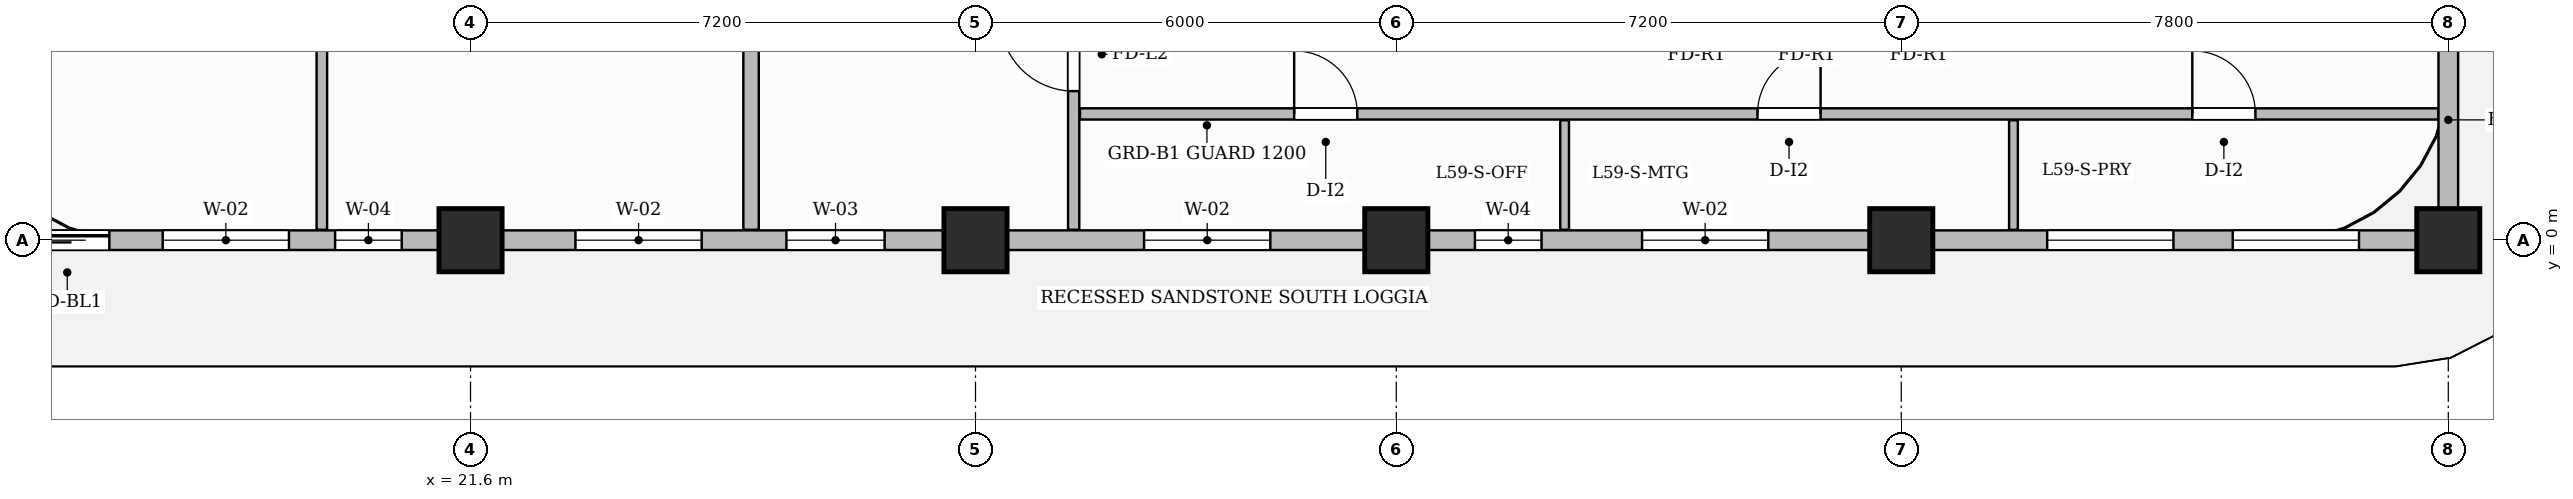
"""IFC4 building model, lengths in metres.
Left out: names, types, materials, properties, quantities, classifications, styles, units other than length and angle.
Written with IfcOpenShell. Run it as: python <this file> out.ifc"""

import sys

from ifc_helpers import new_model, si_unit, direction, frame, frame_2d, origin, origin_2d, place, context, subcontext, project, spatial, rectangle, extrude, source, transform, mapped, element, fill, save


model = new_model("IFC4")
c1 = context("Model", 3, precision=1e-05, world=origin(), true_north=direction((0.0, 1.0)))
c2 = subcontext(c1, "Body", "Model", "MODEL_VIEW")
j1 = project(units=[si_unit("LENGTHUNIT", "METRE"), si_unit("PLANEANGLEUNIT", "RADIAN")], contexts=[c1])
p1 = place(None, origin())
s1 = spatial("IfcSite", under=j1, at=p1, CompositionType="ELEMENT")
p2 = place(p1, origin())
s2 = spatial("IfcBuilding", under=s1, at=p2, CompositionType="ELEMENT")
p3 = place(p2, frame((0.0, 0.0, 236.55)))
s3 = spatial("IfcBuildingStorey", under=s2, at=p3, CompositionType="ELEMENT", Elevation=236.55)
m1 = source(origin(), c2, "Body", "SweptSolid", [
    extrude(rectangle(XDim=0.9, YDim=0.9, at=origin_2d()), origin(), (0.0, 0.0, 1.0), 3.85),
])
for number, where, z_axis, x_axis in (
    (1, (21.6, 0.0, 0.0), (0.0, 0.0, 1.0), (1.0, 0.0, 0.0)),
    (2, (28.8, 0.0, 0.0), (0.0, 0.0, 1.0), (1.0, 0.0, 0.0)),
    (3, (34.8, 0.0, 0.0), (0.0, 0.0, 1.0), (1.0, 0.0, 0.0)),
    (4, (42.0, 0.0, 0.0), (0.0, 0.0, 1.0), (1.0, 0.0, 0.0)),
    (5, (49.8, 0.0, 0.0), (0.0, 0.0, 1.0), (1.0, 0.0, 0.0)),
):
    element("IfcColumn", number, at=place(p3, frame(where, z_axis=z_axis, x_axis=x_axis)), inside=s3, PredefinedType="COLUMN", context=c2, shape_type="MappedRepresentation", body=[
        mapped(m1, transform((0.0, 0.0, 0.0), scale=1.0)),
    ])
p4 = place(p3, frame((30.2, 0.148, 0.0), z_axis=(0.0, 0.0, 1.0), x_axis=(0.0, 1.0, 0.0)))
e6 = element("IfcWall", 6, at=p4, inside=s3, PredefinedType="PARTITIONING", context=c2, shape_type="SweptSolid", body=[
    extrude(rectangle(XDim=10.112, YDim=0.16, at=frame_2d((5.056, 0.0))), origin(), (0.0, 0.0, 1.0), 3.6),
])
p5 = place(p4, frame((1.977, 0.0, 0.0)))
e7 = element("IfcOpeningElement", 7, at=p5, cuts=e6, PredefinedType="OPENING", context=c2, shape_type="SweptSolid", body=[
    extrude(rectangle(XDim=1.05, YDim=2.15, at=frame_2d((0.525, 1.075))), frame((0.0, 0.09, 0.0), z_axis=(0.0, -1.0, 0.0), x_axis=(1.0, 0.0, 0.0)), (0.0, 0.0, 1.0), 0.18),
])
p6 = place(p3, frame((30.29, 1.8, 0.0), z_axis=(0.0, 0.0, 1.0), x_axis=(1.0, 0.0, 0.0)))
e8 = element("IfcWall", 8, at=p6, inside=s3, PredefinedType="PARTITIONING", context=c2, shape_type="SweptSolid", body=[
    extrude(rectangle(XDim=19.37, YDim=0.16, at=frame_2d((9.685, 0.0))), origin(), (0.0, 0.0, 1.0), 3.6),
])
p7 = place(p6, frame((3.054, 0.0, 0.0)))
e9 = element("IfcOpeningElement", 9, at=p7, cuts=e8, PredefinedType="OPENING", context=c2, shape_type="SweptSolid", body=[
    extrude(rectangle(XDim=0.9, YDim=2.15, at=frame_2d((0.45, 1.075))), frame((0.0, 0.09, 0.0), z_axis=(0.0, -1.0, 0.0), x_axis=(1.0, 0.0, 0.0)), (0.0, 0.0, 1.0), 0.18),
])
p8 = place(p6, frame((9.66, 0.0, 0.0)))
e10 = element("IfcOpeningElement", 10, at=p8, cuts=e8, PredefinedType="OPENING", context=c2, shape_type="SweptSolid", body=[
    extrude(rectangle(XDim=0.9, YDim=2.15, at=frame_2d((0.45, 1.075))), frame((0.0, 0.09, 0.0), z_axis=(0.0, -1.0, 0.0), x_axis=(1.0, 0.0, 0.0)), (0.0, 0.0, 1.0), 0.18),
])
p9 = place(p6, frame((15.86, 0.0, 0.0)))
e11 = element("IfcOpeningElement", 11, at=p9, cuts=e8, PredefinedType="OPENING", context=c2, shape_type="SweptSolid", body=[
    extrude(rectangle(XDim=0.9, YDim=2.15, at=frame_2d((0.45, 1.075))), frame((0.0, 0.09, 0.0), z_axis=(0.0, -1.0, 0.0), x_axis=(1.0, 0.0, 0.0)), (0.0, 0.0, 1.0), 0.18),
])
for number, where, z_axis, x_axis in (
    (12, (37.2, 0.148, 0.0), (0.0, 0.0, 1.0), (0.0, 1.0, 0.0)),
    (13, (43.6, 0.148, 0.0), (0.0, 0.0, 1.0), (0.0, 1.0, 0.0)),
):
    element("IfcWall", number, at=place(p3, frame(where, z_axis=z_axis, x_axis=x_axis)), inside=s3, PredefinedType="PARTITIONING", context=c2, shape_type="SweptSolid", body=[
        extrude(rectangle(XDim=1.562, YDim=0.125, at=frame_2d((0.781, 0.0))), origin(), (0.0, 0.0, 1.0), 3.6),
    ])
p10 = place(p3, frame((25.6, 0.148, 0.0), z_axis=(0.0, 0.0, 1.0), x_axis=(0.0, 1.0, 0.0)))
e14 = element("IfcWall", 14, at=p10, inside=s3, PredefinedType="PARTITIONING", context=c2, shape_type="SweptSolid", body=[
    extrude(rectangle(XDim=10.112, YDim=0.22, at=frame_2d((5.056, 0.0))), origin(), (0.0, 0.0, 1.0), 3.6),
])
p11 = place(p3, frame((19.48, 0.148, 0.0), z_axis=(0.0, 0.0, 1.0), x_axis=(0.0, 1.0, 0.0)))
e15 = element("IfcWall", 15, at=p11, inside=s3, PredefinedType="PARTITIONING", context=c2, shape_type="SweptSolid", body=[
    extrude(rectangle(XDim=10.112, YDim=0.15, at=frame_2d((5.056, 0.0))), origin(), (0.0, 0.0, 1.0), 3.6),
])
p12 = place(p11, frame((8.677, 0.0, 0.0)))
e16 = element("IfcOpeningElement", 16, at=p12, cuts=e15, PredefinedType="OPENING", context=c2, shape_type="SweptSolid", body=[
    extrude(rectangle(XDim=0.9, YDim=2.15, at=frame_2d((0.45, 1.075))), frame((0.0, 0.085, 0.0), z_axis=(0.0, -1.0, 0.0), x_axis=(1.0, 0.0, 0.0)), (0.0, 0.0, 1.0), 0.17),
])
p13 = place(p3, frame((14.4, 0.0, 0.0), z_axis=(0.0, 0.0, 1.0), x_axis=(1.0, 0.0, 0.0)))
e17 = element("IfcWall", 17, at=p13, inside=s3, PredefinedType="SOLIDWALL", context=c2, shape_type="SweptSolid", body=[
    extrude(rectangle(XDim=35.4, YDim=0.28, at=frame_2d((17.7, 0.0))), origin(), (0.0, 0.0, 1.0), 3.135),
])
p14 = place(p13, frame((0.85, 0.0, 0.0)))
e18 = element("IfcOpeningElement", 18, at=p14, cuts=e17, PredefinedType="OPENING", context=c2, shape_type="SweptSolid", body=[
    extrude(rectangle(XDim=1.2, YDim=2.2, at=frame_2d((0.6, 1.1))), frame((0.0, 0.15, 0.0), z_axis=(0.0, -1.0, 0.0), x_axis=(1.0, 0.0, 0.0)), (0.0, 0.0, 1.0), 0.3),
])
p15 = place(p13, frame((2.811, 0.0, 0.8)))
e19 = element("IfcOpeningElement", 19, at=p15, cuts=e17, PredefinedType="OPENING", context=c2, shape_type="SweptSolid", body=[
    extrude(rectangle(XDim=1.8, YDim=1.85, at=frame_2d((0.9, 0.925))), frame((0.0, 0.15, 0.0), z_axis=(0.0, -1.0, 0.0), x_axis=(1.0, 0.0, 0.0)), (0.0, 0.0, 1.0), 0.3),
])
p16 = place(p13, frame((5.269, 0.0, 0.8)))
e20 = element("IfcOpeningElement", 20, at=p16, cuts=e17, PredefinedType="OPENING", context=c2, shape_type="SweptSolid", body=[
    extrude(rectangle(XDim=0.95, YDim=1.75, at=frame_2d((0.475, 0.875))), frame((0.0, 0.15, 0.0), z_axis=(0.0, -1.0, 0.0), x_axis=(1.0, 0.0, 0.0)), (0.0, 0.0, 1.0), 0.3),
])
p17 = place(p13, frame((8.696, 0.0, 0.8)))
e21 = element("IfcOpeningElement", 21, at=p17, cuts=e17, PredefinedType="OPENING", context=c2, shape_type="SweptSolid", body=[
    extrude(rectangle(XDim=1.8, YDim=1.85, at=frame_2d((0.9, 0.925))), frame((0.0, 0.15, 0.0), z_axis=(0.0, -1.0, 0.0), x_axis=(1.0, 0.0, 0.0)), (0.0, 0.0, 1.0), 0.3),
])
p18 = place(p13, frame((11.704, 0.0, 0.8)))
e22 = element("IfcOpeningElement", 22, at=p18, cuts=e17, PredefinedType="OPENING", context=c2, shape_type="SweptSolid", body=[
    extrude(rectangle(XDim=1.4, YDim=1.85, at=frame_2d((0.7, 0.925))), frame((0.0, 0.15, 0.0), z_axis=(0.0, -1.0, 0.0), x_axis=(1.0, 0.0, 0.0)), (0.0, 0.0, 1.0), 0.3),
])
p19 = place(p13, frame((16.804, 0.0, 0.8)))
e23 = element("IfcOpeningElement", 23, at=p19, cuts=e17, PredefinedType="OPENING", context=c2, shape_type="SweptSolid", body=[
    extrude(rectangle(XDim=1.8, YDim=1.85, at=frame_2d((0.9, 0.925))), frame((0.0, 0.15, 0.0), z_axis=(0.0, -1.0, 0.0), x_axis=(1.0, 0.0, 0.0)), (0.0, 0.0, 1.0), 0.3),
])
p20 = place(p13, frame((21.521, 0.0, 0.8)))
e24 = element("IfcOpeningElement", 24, at=p20, cuts=e17, PredefinedType="OPENING", context=c2, shape_type="SweptSolid", body=[
    extrude(rectangle(XDim=0.95, YDim=1.75, at=frame_2d((0.475, 0.875))), frame((0.0, 0.15, 0.0), z_axis=(0.0, -1.0, 0.0), x_axis=(1.0, 0.0, 0.0)), (0.0, 0.0, 1.0), 0.3),
])
p21 = place(p13, frame((23.904, 0.0, 0.8)))
e25 = element("IfcOpeningElement", 25, at=p21, cuts=e17, PredefinedType="OPENING", context=c2, shape_type="SweptSolid", body=[
    extrude(rectangle(XDim=1.8, YDim=1.85, at=frame_2d((0.9, 0.925))), frame((0.0, 0.15, 0.0), z_axis=(0.0, -1.0, 0.0), x_axis=(1.0, 0.0, 0.0)), (0.0, 0.0, 1.0), 0.3),
])
p22 = place(p13, frame((29.681, 0.0, 0.8)))
e26 = element("IfcOpeningElement", 26, at=p22, cuts=e17, PredefinedType="OPENING", context=c2, shape_type="SweptSolid", body=[
    extrude(rectangle(XDim=1.8, YDim=1.85, at=frame_2d((0.9, 0.925))), frame((0.0, 0.15, 0.0), z_axis=(0.0, -1.0, 0.0), x_axis=(1.0, 0.0, 0.0)), (0.0, 0.0, 1.0), 0.3),
])
p23 = place(p13, frame((32.327, 0.0, 0.8)))
e27 = element("IfcOpeningElement", 27, at=p23, cuts=e17, PredefinedType="OPENING", context=c2, shape_type="SweptSolid", body=[
    extrude(rectangle(XDim=1.8, YDim=1.85, at=frame_2d((0.9, 0.925))), frame((0.0, 0.15, 0.0), z_axis=(0.0, -1.0, 0.0), x_axis=(1.0, 0.0, 0.0)), (0.0, 0.0, 1.0), 0.3),
])
p24 = place(p3, frame((49.8, 0.05, 0.0), z_axis=(0.0, 0.0, 1.0), x_axis=(0.0, 1.0, 0.0)))
e28 = element("IfcWall", 28, at=p24, inside=s3, PredefinedType="SOLIDWALL", context=c2, shape_type="SweptSolid", body=[
    extrude(rectangle(XDim=3.33, YDim=0.28, at=frame_2d((1.665, 0.0))), origin(), (0.0, 0.0, 1.0), 3.6),
])
m2 = source(origin(), c2, "Body", "SweptSolid", [
    extrude(rectangle(XDim=1.05, YDim=2.15, at=frame_2d((0.525, 1.075))), frame((0.0, 0.025, 0.0), z_axis=(0.0, -1.0, 0.0), x_axis=(1.0, 0.0, 0.0)), (0.0, 0.0, 1.0), 0.05),
])
p25 = place(p5, origin())
e29 = element("IfcDoor", 29, at=p25, inside=s3, OperationType="SINGLE_SWING_RIGHT", PredefinedType="DOOR", context=c2, shape_type="MappedRepresentation", body=[
    mapped(m2, transform((0.0, 0.0, 0.0), scale=1.0)),
])
fill(e7, e29)
m3 = source(origin(), c2, "Body", "SweptSolid", [
    extrude(rectangle(XDim=0.9, YDim=2.15, at=frame_2d((0.45, 1.075))), frame((0.0, 0.025, 0.0), z_axis=(0.0, -1.0, 0.0), x_axis=(1.0, 0.0, 0.0)), (0.0, 0.0, 1.0), 0.05),
])
p26 = place(p7, origin())
e30 = element("IfcDoor", 30, at=p26, inside=s3, OperationType="SINGLE_SWING_LEFT", PredefinedType="DOOR", context=c2, shape_type="MappedRepresentation", body=[
    mapped(m3, transform((0.0, 0.0, 0.0), scale=1.0)),
])
fill(e9, e30)
p27 = place(p8, origin())
e31 = element("IfcDoor", 31, at=p27, inside=s3, OperationType="SINGLE_SWING_RIGHT", PredefinedType="DOOR", context=c2, shape_type="MappedRepresentation", body=[
    mapped(m3, transform((0.0, 0.0, 0.0), scale=1.0)),
])
fill(e10, e31)
p28 = place(p9, origin())
e32 = element("IfcDoor", 32, at=p28, inside=s3, OperationType="SINGLE_SWING_LEFT", PredefinedType="DOOR", context=c2, shape_type="MappedRepresentation", body=[
    mapped(m3, transform((0.0, 0.0, 0.0), scale=1.0)),
])
fill(e11, e32)
m4 = source(origin(), c2, "Body", "SweptSolid", [
    extrude(rectangle(XDim=1.2, YDim=2.2, at=frame_2d((0.6, 1.1))), frame((0.0, 0.025, 0.0), z_axis=(0.0, -1.0, 0.0), x_axis=(1.0, 0.0, 0.0)), (0.0, 0.0, 1.0), 0.05),
])
p29 = place(p14, origin())
e33 = element("IfcDoor", 33, at=p29, inside=s3, OperationType="SLIDING_TO_LEFT", PredefinedType="DOOR", context=c2, shape_type="MappedRepresentation", body=[
    mapped(m4, transform((0.0, 0.0, 0.0), scale=1.0)),
])
fill(e18, e33)
m5 = source(origin(), c2, "Body", "SweptSolid", [
    extrude(rectangle(XDim=1.8, YDim=1.85, at=frame_2d((0.9, 0.925))), frame((0.0, 0.03, 0.0), z_axis=(0.0, -1.0, 0.0), x_axis=(1.0, 0.0, 0.0)), (0.0, 0.0, 1.0), 0.06),
])
p30 = place(p15, origin())
e34 = element("IfcWindow", 34, at=p30, inside=s3, PartitioningType="DOUBLE_PANEL_VERTICAL", PredefinedType="WINDOW", context=c2, shape_type="MappedRepresentation", body=[
    mapped(m5, transform((0.0, 0.0, 0.0), scale=1.0)),
])
fill(e19, e34)
m6 = source(origin(), c2, "Body", "SweptSolid", [
    extrude(rectangle(XDim=0.95, YDim=1.75, at=frame_2d((0.475, 0.875))), frame((0.0, 0.03, 0.0), z_axis=(0.0, -1.0, 0.0), x_axis=(1.0, 0.0, 0.0)), (0.0, 0.0, 1.0), 0.06),
])
p31 = place(p16, origin())
e35 = element("IfcWindow", 35, at=p31, inside=s3, PartitioningType="SINGLE_PANEL", PredefinedType="WINDOW", context=c2, shape_type="MappedRepresentation", body=[
    mapped(m6, transform((0.0, 0.0, 0.0), scale=1.0)),
])
fill(e20, e35)
p32 = place(p17, origin())
e36 = element("IfcWindow", 36, at=p32, inside=s3, PartitioningType="DOUBLE_PANEL_VERTICAL", PredefinedType="WINDOW", context=c2, shape_type="MappedRepresentation", body=[
    mapped(m5, transform((0.0, 0.0, 0.0), scale=1.0)),
])
fill(e21, e36)
m7 = source(origin(), c2, "Body", "SweptSolid", [
    extrude(rectangle(XDim=1.4, YDim=1.85, at=frame_2d((0.7, 0.925))), frame((0.0, 0.03, 0.0), z_axis=(0.0, -1.0, 0.0), x_axis=(1.0, 0.0, 0.0)), (0.0, 0.0, 1.0), 0.06),
])
p33 = place(p18, origin())
e37 = element("IfcWindow", 37, at=p33, inside=s3, PartitioningType="SINGLE_PANEL", PredefinedType="WINDOW", context=c2, shape_type="MappedRepresentation", body=[
    mapped(m7, transform((0.0, 0.0, 0.0), scale=1.0)),
])
fill(e22, e37)
p34 = place(p19, origin())
e38 = element("IfcWindow", 38, at=p34, inside=s3, PartitioningType="DOUBLE_PANEL_VERTICAL", PredefinedType="WINDOW", context=c2, shape_type="MappedRepresentation", body=[
    mapped(m5, transform((0.0, 0.0, 0.0), scale=1.0)),
])
fill(e23, e38)
p35 = place(p20, origin())
e39 = element("IfcWindow", 39, at=p35, inside=s3, PartitioningType="SINGLE_PANEL", PredefinedType="WINDOW", context=c2, shape_type="MappedRepresentation", body=[
    mapped(m6, transform((0.0, 0.0, 0.0), scale=1.0)),
])
fill(e24, e39)
p36 = place(p21, origin())
e40 = element("IfcWindow", 40, at=p36, inside=s3, PartitioningType="DOUBLE_PANEL_VERTICAL", PredefinedType="WINDOW", context=c2, shape_type="MappedRepresentation", body=[
    mapped(m5, transform((0.0, 0.0, 0.0), scale=1.0)),
])
fill(e25, e40)
p37 = place(p22, origin())
e41 = element("IfcWindow", 41, at=p37, inside=s3, PartitioningType="DOUBLE_PANEL_VERTICAL", PredefinedType="WINDOW", context=c2, shape_type="MappedRepresentation", body=[
    mapped(m5, transform((0.0, 0.0, 0.0), scale=1.0)),
])
fill(e26, e41)
p38 = place(p23, origin())
e42 = element("IfcWindow", 42, at=p38, inside=s3, PartitioningType="DOUBLE_PANEL_VERTICAL", PredefinedType="WINDOW", context=c2, shape_type="MappedRepresentation", body=[
    mapped(m5, transform((0.0, 0.0, 0.0), scale=1.0)),
])
fill(e27, e42)
save(model, sys.argv[1])
